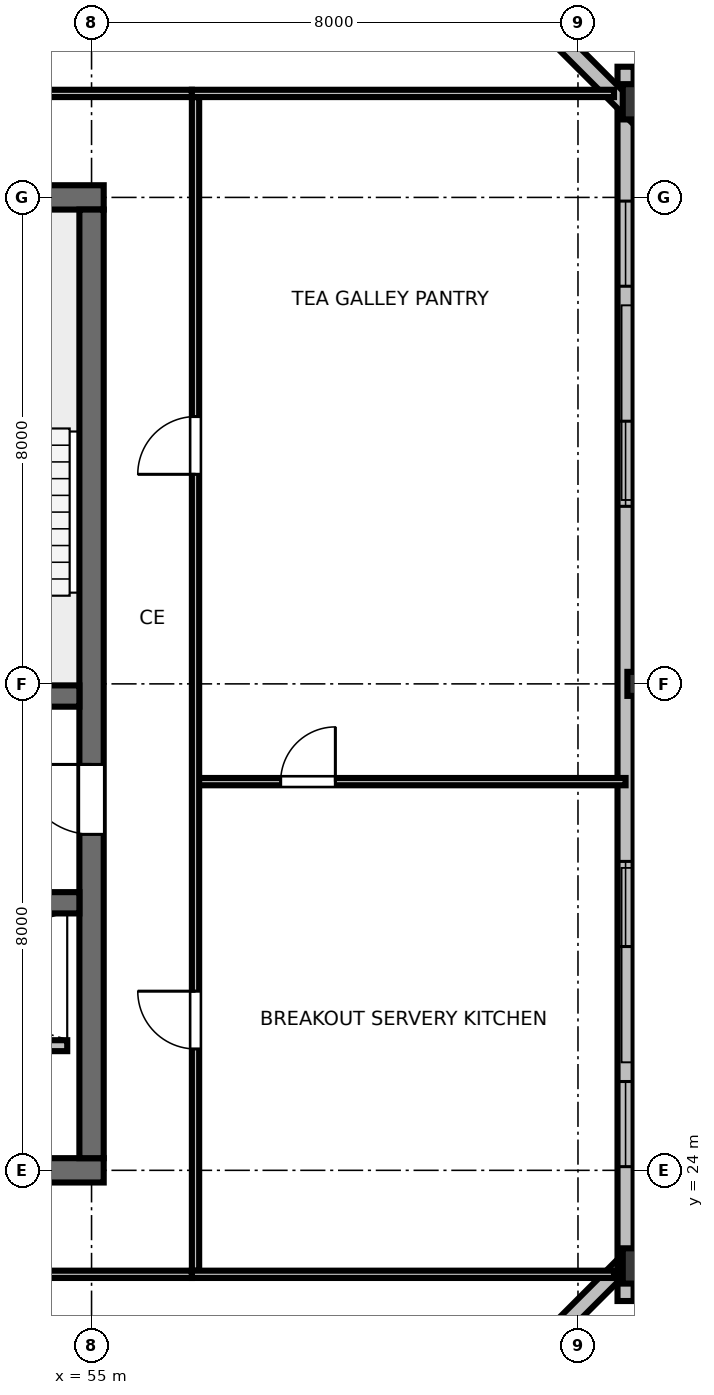
"""IFC4 building model, lengths in metres.
Left out: names, types, materials, properties, quantities, classifications, styles, units other than length and angle.
Written with IfcOpenShell. Run it as: python <this file> out.ifc"""

import sys

from ifc_helpers import new_model, si_unit, direction, frame, frame_2d, origin, origin_2d, place, context, subcontext, project, spatial, rectangle, hollow_rectangle, i_section, extrude, element, fill, save


model = new_model("IFC4")
c1 = context("Model", 3, precision=1e-05, world=origin(), true_north=direction((0.0, 1.0)))
c2 = subcontext(c1, "Body", "Model", "MODEL_VIEW")
j1 = project(units=[si_unit("LENGTHUNIT", "METRE"), si_unit("PLANEANGLEUNIT", "RADIAN")], contexts=[c1])
p1 = place(None, origin())
s1 = spatial("IfcSite", under=j1, at=p1, CompositionType="ELEMENT")
p2 = place(p1, origin())
s2 = spatial("IfcBuilding", under=s1, at=p2, CompositionType="ELEMENT")
p3 = place(p2, frame((0.0, 0.0, 268.2)))
s3 = spatial("IfcBuildingStorey", under=s2, at=p3, CompositionType="ELEMENT", Elevation=268.2)
p4 = place(p3, frame((36.8, 24.0, 0.0), z_axis=(0.0, 0.0, 1.0), x_axis=(1.0, 0.0, 0.0)))
e1 = element("IfcWall", 1, at=p4, inside=s3, PredefinedType="SHEAR", context=c2, shape_type="SweptSolid", body=[
    extrude(rectangle(XDim=18.4, YDim=0.4, at=frame_2d((9.2, 0.0))), origin(), (0.0, 0.0, 1.0), 3.36),
])
p5 = place(p4, frame((13.4, 0.0, 0.0)))
e2 = element("IfcOpeningElement", 2, at=p5, cuts=e1, PredefinedType="OPENING", context=c2, shape_type="SweptSolid", body=[
    extrude(rectangle(XDim=1.6, YDim=2.15, at=frame_2d((0.8, 1.075))), frame((0.0, 0.21, 0.0), z_axis=(0.0, -1.0, 0.0), x_axis=(1.0, 0.0, 0.0)), (0.0, 0.0, 1.0), 0.42),
])
p6 = place(p3, frame((36.8, 40.0, 0.0), z_axis=(0.0, 0.0, 1.0), x_axis=(1.0, 0.0, 0.0)))
e3 = element("IfcWall", 3, at=p6, inside=s3, PredefinedType="SHEAR", context=c2, shape_type="SweptSolid", body=[
    extrude(rectangle(XDim=18.4, YDim=0.4, at=frame_2d((9.2, 0.0))), origin(), (0.0, 0.0, 1.0), 3.36),
])
p7 = place(p6, frame((10.5, 0.0, 0.0)))
e4 = element("IfcOpeningElement", 4, at=p7, cuts=e3, PredefinedType="OPENING", context=c2, shape_type="SweptSolid", body=[
    extrude(rectangle(XDim=1.0, YDim=2.15, at=frame_2d((0.5, 1.075))), frame((0.0, 0.21, 0.0), z_axis=(0.0, -1.0, 0.0), x_axis=(1.0, 0.0, 0.0)), (0.0, 0.0, 1.0), 0.42),
])
p8 = place(p3, frame((55.0, 24.2, 0.0), z_axis=(0.0, 0.0, 1.0), x_axis=(0.0, 1.0, 0.0)))
e5 = element("IfcWall", 5, at=p8, inside=s3, PredefinedType="SHEAR", context=c2, shape_type="SweptSolid", body=[
    extrude(rectangle(XDim=15.6, YDim=0.4, at=frame_2d((7.8, 0.0))), origin(), (0.0, 0.0, 1.0), 3.36),
])
p9 = place(p8, frame((5.325, 0.0, 0.0)))
e6 = element("IfcOpeningElement", 6, at=p9, cuts=e5, PredefinedType="OPENING", context=c2, shape_type="SweptSolid", body=[
    extrude(rectangle(XDim=1.15, YDim=2.15, at=frame_2d((0.575, 1.075))), frame((0.0, 0.21, 0.0), z_axis=(0.0, -1.0, 0.0), x_axis=(1.0, 0.0, 0.0)), (0.0, 0.0, 1.0), 0.42),
])
p10 = place(p3, frame((37.2, 31.8, 0.0), z_axis=(0.0, 0.0, 1.0), x_axis=(1.0, 0.0, 0.0)))
e7 = element("IfcWall", 7, at=p10, inside=s3, PredefinedType="SHEAR", context=c2, shape_type="SweptSolid", body=[
    extrude(rectangle(XDim=17.6, YDim=0.35, at=frame_2d((8.8, 0.0))), origin(), (0.0, 0.0, 1.0), 3.36),
])
p11 = place(p10, frame((0.85, 0.0, 0.0)))
e8 = element("IfcOpeningElement", 8, at=p11, cuts=e7, PredefinedType="OPENING", context=c2, shape_type="SweptSolid", body=[
    extrude(rectangle(XDim=1.1, YDim=2.15, at=frame_2d((0.55, 1.075))), frame((0.0, 0.185, 0.0), z_axis=(0.0, -1.0, 0.0), x_axis=(1.0, 0.0, 0.0)), (0.0, 0.0, 1.0), 0.37),
])
p12 = place(p10, frame((14.75, 0.0, 0.0)))
e9 = element("IfcOpeningElement", 9, at=p12, cuts=e7, PredefinedType="OPENING", context=c2, shape_type="SweptSolid", body=[
    extrude(rectangle(XDim=1.1, YDim=2.15, at=frame_2d((0.55, 1.075))), frame((0.0, 0.185, 0.0), z_axis=(0.0, -1.0, 0.0), x_axis=(1.0, 0.0, 0.0)), (0.0, 0.0, 1.0), 0.37),
])
p13 = place(p3, frame((37.2, 28.4, 0.0), z_axis=(0.0, 0.0, 1.0), x_axis=(1.0, 0.0, 0.0)))
e10 = element("IfcWall", 10, at=p13, inside=s3, PredefinedType="SHEAR", context=c2, shape_type="SweptSolid", body=[
    extrude(rectangle(XDim=17.6, YDim=0.35, at=frame_2d((8.8, 0.0))), origin(), (0.0, 0.0, 1.0), 3.36),
])
p14 = place(p3, frame((64.086, 22.428, 0.0), z_axis=(-0.177666210098, 0.155370015085, 0.971748360535), x_axis=(0.731494530151, -0.639695731236, 0.236019329289)))
e11 = element("IfcColumn", 11, at=p14, inside=s3, PredefinedType="COLUMN", context=c2, shape_type="SweptSolid", body=[
    extrude(hollow_rectangle(XDim=0.58, YDim=0.7, WallThickness=0.032, at=origin_2d()), origin(), (0.0, 0.0, 1.0), 3.471),
])
p15 = place(p3, frame((64.003, 32.0, 0.0), z_axis=(-0.178954370443, 0.0, 0.98385737447), x_axis=(0.98385737447, 0.0, 0.178954370443)))
e12 = element("IfcColumn", 12, at=p15, inside=s3, PredefinedType="COLUMN", context=c2, shape_type="SweptSolid", body=[
    extrude(i_section(OverallWidth=0.395, OverallDepth=0.38, WebThickness=0.019, FlangeThickness=0.03, FilletRadius=0.025, at=origin_2d()), origin(), (0.0, 0.0, 1.0), 3.428),
])
p16 = place(p3, frame((64.086, 41.572, 0.0), z_axis=(-0.177666210098, -0.155370015085, 0.971748360535), x_axis=(0.731494530151, 0.639695731236, 0.236019329289)))
e13 = element("IfcColumn", 13, at=p16, inside=s3, PredefinedType="COLUMN", context=c2, shape_type="SweptSolid", body=[
    extrude(hollow_rectangle(XDim=0.58, YDim=0.7, WallThickness=0.032, at=origin_2d()), origin(), (0.0, 0.0, 1.0), 3.471),
])
p17 = place(p3, frame((56.47, 15.168, 0.0), z_axis=(0.0, 0.0, 1.0), x_axis=(0.707106781187, 0.707106781187, 0.0)))
e14 = element("IfcWall", 14, at=p17, inside=s3, PredefinedType="STANDARD", context=c2, shape_type="SweptSolid", body=[
    extrude(rectangle(XDim=10.971, YDim=0.265, at=frame_2d((5.485, 0.0))), origin(), (0.0, 0.0, 1.0), 3.375),
])
p18 = place(p3, frame((63.783, 21.851, 0.0), z_axis=(0.0, 0.0, 1.0), x_axis=(0.0, 1.0, 0.0)))
e15 = element("IfcWall", 15, at=p18, inside=s3, PredefinedType="STANDARD", context=c2, shape_type="SweptSolid", body=[
    extrude(rectangle(XDim=20.298, YDim=0.265, at=frame_2d((10.149, 0.0))), origin(), (0.0, 0.0, 1.0), 2.832),
])
p19 = place(p18, frame((2.21, 0.0, 0.85)))
e16 = element("IfcOpeningElement", 16, at=p19, cuts=e15, PredefinedType="OPENING", context=c2, shape_type="SweptSolid", body=[
    extrude(rectangle(XDim=1.4, YDim=1.2, at=frame_2d((0.7, 0.6))), frame((0.0, 0.142, 0.0), z_axis=(0.0, -1.0, 0.0), x_axis=(1.0, 0.0, 0.0)), (0.0, 0.0, 1.0), 0.285),
])
p20 = place(p18, frame((5.83, 0.0, 0.85)))
e17 = element("IfcOpeningElement", 17, at=p20, cuts=e15, PredefinedType="OPENING", context=c2, shape_type="SweptSolid", body=[
    extrude(rectangle(XDim=1.4, YDim=1.2, at=frame_2d((0.7, 0.6))), frame((0.0, 0.142, 0.0), z_axis=(0.0, -1.0, 0.0), x_axis=(1.0, 0.0, 0.0)), (0.0, 0.0, 1.0), 0.285),
])
p21 = place(p18, frame((13.069, 0.0, 0.85)))
e18 = element("IfcOpeningElement", 18, at=p21, cuts=e15, PredefinedType="OPENING", context=c2, shape_type="SweptSolid", body=[
    extrude(rectangle(XDim=1.4, YDim=1.2, at=frame_2d((0.7, 0.6))), frame((0.0, 0.142, 0.0), z_axis=(0.0, -1.0, 0.0), x_axis=(1.0, 0.0, 0.0)), (0.0, 0.0, 1.0), 0.285),
])
p22 = place(p18, frame((16.688, 0.0, 0.85)))
e19 = element("IfcOpeningElement", 19, at=p22, cuts=e15, PredefinedType="OPENING", context=c2, shape_type="SweptSolid", body=[
    extrude(rectangle(XDim=1.4, YDim=1.2, at=frame_2d((0.7, 0.6))), frame((0.0, 0.142, 0.0), z_axis=(0.0, -1.0, 0.0), x_axis=(1.0, 0.0, 0.0)), (0.0, 0.0, 1.0), 0.285),
])
p23 = place(p3, frame((64.228, 41.075, 0.0), z_axis=(0.0, 0.0, 1.0), x_axis=(-0.707106781187, 0.707106781187, 0.0)))
e20 = element("IfcWall", 20, at=p23, inside=s3, PredefinedType="STANDARD", context=c2, shape_type="SweptSolid", body=[
    extrude(rectangle(XDim=10.971, YDim=0.265, at=frame_2d((5.485, 0.0))), origin(), (0.0, 0.0, 1.0), 3.375),
])
p24 = place(p3, frame((47.6, 26.05, 0.0), z_axis=(0.0, 0.0, 1.0), x_axis=(1.0, 0.0, 0.0)))
e21 = element("IfcWall", 21, at=p24, inside=s3, PredefinedType="PARTITIONING", context=c2, shape_type="SweptSolid", body=[
    extrude(rectangle(XDim=7.0, YDim=0.18, at=frame_2d((3.5, 0.0))), origin(), (0.0, 0.0, 1.0), 3.375),
])
p25 = place(p24, frame((1.2, 0.0, 0.0)))
e22 = element("IfcOpeningElement", 22, at=p25, cuts=e21, PredefinedType="OPENING", context=c2, shape_type="SweptSolid", body=[
    extrude(rectangle(XDim=1.05, YDim=2.15, at=frame_2d((0.525, 1.075))), frame((0.0, 0.1, 0.0), z_axis=(0.0, -1.0, 0.0), x_axis=(1.0, 0.0, 0.0)), (0.0, 0.0, 1.0), 0.2),
])
p26 = place(p24, frame((3.4, 0.0, 0.0)))
e23 = element("IfcOpeningElement", 23, at=p26, cuts=e21, PredefinedType="OPENING", context=c2, shape_type="SweptSolid", body=[
    extrude(rectangle(XDim=1.05, YDim=2.15, at=frame_2d((0.525, 1.075))), frame((0.0, 0.1, 0.0), z_axis=(0.0, -1.0, 0.0), x_axis=(1.0, 0.0, 0.0)), (0.0, 0.0, 1.0), 0.2),
])
p27 = place(p3, frame((35.35, 22.29, 0.0), z_axis=(0.0, 0.0, 1.0), x_axis=(1.0, 0.0, 0.0)))
e24 = element("IfcWall", 24, at=p27, inside=s3, PredefinedType="PARTITIONING", context=c2, shape_type="SweptSolid", body=[
    extrude(rectangle(XDim=21.3, YDim=0.12, at=frame_2d((10.65, 0.0))), origin(), (0.0, 0.0, 1.0), 2.655),
])
p28 = place(p27, frame((4.425, 0.0, 0.0)))
e25 = element("IfcOpeningElement", 25, at=p28, cuts=e24, PredefinedType="OPENING", context=c2, shape_type="SweptSolid", body=[
    extrude(rectangle(XDim=0.95, YDim=2.15, at=frame_2d((0.475, 1.075))), frame((0.0, 0.07, 0.0), z_axis=(0.0, -1.0, 0.0), x_axis=(1.0, 0.0, 0.0)), (0.0, 0.0, 1.0), 0.14),
])
p29 = place(p27, frame((13.051, 0.0, 0.0)))
e26 = element("IfcOpeningElement", 26, at=p29, cuts=e24, PredefinedType="OPENING", context=c2, shape_type="SweptSolid", body=[
    extrude(rectangle(XDim=0.95, YDim=2.15, at=frame_2d((0.475, 1.075))), frame((0.0, 0.07, 0.0), z_axis=(0.0, -1.0, 0.0), x_axis=(1.0, 0.0, 0.0)), (0.0, 0.0, 1.0), 0.14),
])
p30 = place(p27, frame((17.811, 0.0, 0.0)))
e27 = element("IfcOpeningElement", 27, at=p30, cuts=e24, PredefinedType="OPENING", context=c2, shape_type="SweptSolid", body=[
    extrude(rectangle(XDim=0.95, YDim=2.15, at=frame_2d((0.475, 1.075))), frame((0.0, 0.07, 0.0), z_axis=(0.0, -1.0, 0.0), x_axis=(1.0, 0.0, 0.0)), (0.0, 0.0, 1.0), 0.14),
])
p31 = place(p3, frame((35.35, 41.71, 0.0), z_axis=(0.0, 0.0, 1.0), x_axis=(1.0, 0.0, 0.0)))
e28 = element("IfcWall", 28, at=p31, inside=s3, PredefinedType="PARTITIONING", context=c2, shape_type="SweptSolid", body=[
    extrude(rectangle(XDim=21.3, YDim=0.12, at=frame_2d((10.65, 0.0))), origin(), (0.0, 0.0, 1.0), 2.655),
])
p32 = place(p31, frame((4.361, 0.0, 0.0)))
e29 = element("IfcOpeningElement", 29, at=p32, cuts=e28, PredefinedType="OPENING", context=c2, shape_type="SweptSolid", body=[
    extrude(rectangle(XDim=0.95, YDim=2.15, at=frame_2d((0.475, 1.075))), frame((0.0, 0.07, 0.0), z_axis=(0.0, -1.0, 0.0), x_axis=(1.0, 0.0, 0.0)), (0.0, 0.0, 1.0), 0.14),
])
p33 = place(p31, frame((15.925, 0.0, 0.0)))
e30 = element("IfcOpeningElement", 30, at=p33, cuts=e28, PredefinedType="OPENING", context=c2, shape_type="SweptSolid", body=[
    extrude(rectangle(XDim=0.95, YDim=2.15, at=frame_2d((0.475, 1.075))), frame((0.0, 0.07, 0.0), z_axis=(0.0, -1.0, 0.0), x_axis=(1.0, 0.0, 0.0)), (0.0, 0.0, 1.0), 0.14),
])
p34 = place(p3, frame((56.71, 30.392, 0.0), z_axis=(0.0, 0.0, 1.0), x_axis=(1.0, 0.0, 0.0)))
e31 = element("IfcWall", 31, at=p34, inside=s3, PredefinedType="PARTITIONING", context=c2, shape_type="SweptSolid", body=[
    extrude(rectangle(XDim=7.073, YDim=0.12, at=frame_2d((3.536, 0.0))), origin(), (0.0, 0.0, 1.0), 2.655),
])
p35 = place(p34, frame((1.4, 0.0, 0.0)))
e32 = element("IfcOpeningElement", 32, at=p35, cuts=e31, PredefinedType="OPENING", context=c2, shape_type="SweptSolid", body=[
    extrude(rectangle(XDim=0.9, YDim=2.15, at=frame_2d((0.45, 1.075))), frame((0.0, 0.07, 0.0), z_axis=(0.0, -1.0, 0.0), x_axis=(1.0, 0.0, 0.0)), (0.0, 0.0, 1.0), 0.14),
])
p36 = place(p3, frame((56.71, 22.35, 0.0), z_axis=(0.0, 0.0, 1.0), x_axis=(0.0, 1.0, 0.0)))
e33 = element("IfcWall", 33, at=p36, inside=s3, PredefinedType="PARTITIONING", context=c2, shape_type="SweptSolid", body=[
    extrude(rectangle(XDim=19.3, YDim=0.12, at=frame_2d((9.65, 0.0))), origin(), (0.0, 0.0, 1.0), 2.655),
])
p37 = place(p36, frame((3.646, 0.0, 0.0)))
e34 = element("IfcOpeningElement", 34, at=p37, cuts=e33, PredefinedType="OPENING", context=c2, shape_type="SweptSolid", body=[
    extrude(rectangle(XDim=0.95, YDim=2.15, at=frame_2d((0.475, 1.075))), frame((0.0, 0.07, 0.0), z_axis=(0.0, -1.0, 0.0), x_axis=(1.0, 0.0, 0.0)), (0.0, 0.0, 1.0), 0.14),
])
p38 = place(p36, frame((13.096, 0.0, 0.0)))
e35 = element("IfcOpeningElement", 35, at=p38, cuts=e33, PredefinedType="OPENING", context=c2, shape_type="SweptSolid", body=[
    extrude(rectangle(XDim=0.95, YDim=2.15, at=frame_2d((0.475, 1.075))), frame((0.0, 0.07, 0.0), z_axis=(0.0, -1.0, 0.0), x_axis=(1.0, 0.0, 0.0)), (0.0, 0.0, 1.0), 0.14),
])
for number, where, z_axis, x_axis in (
    (36, (56.65, 22.29, 0.0), (0.0, 0.0, 1.0), (1.0, 0.0, 0.0)),
    (37, (56.65, 41.71, 0.0), (0.0, 0.0, 1.0), (1.0, 0.0, 0.0)),
):
    element("IfcWall", number, at=place(p3, frame(where, z_axis=z_axis, x_axis=x_axis)), inside=s3, PredefinedType="PARTITIONING", context=c2, shape_type="SweptSolid", body=[
        extrude(rectangle(XDim=6.942, YDim=0.12, at=frame_2d((3.471, 0.0))), origin(), (0.0, 0.0, 1.0), 2.655),
    ])
p39 = place(p19, origin())
e38 = element("IfcWindow", 38, at=p39, inside=s3, PartitioningType="SINGLE_PANEL", PredefinedType="WINDOW", context=c2, shape_type="SweptSolid", body=[
    extrude(rectangle(XDim=1.4, YDim=1.2, at=frame_2d((0.7, 0.6))), frame((0.0, 0.03, 0.0), z_axis=(0.0, -1.0, 0.0), x_axis=(1.0, 0.0, 0.0)), (0.0, 0.0, 1.0), 0.06),
])
fill(e16, e38)
p40 = place(p20, origin())
e39 = element("IfcWindow", 39, at=p40, inside=s3, PartitioningType="SINGLE_PANEL", PredefinedType="WINDOW", context=c2, shape_type="SweptSolid", body=[
    extrude(rectangle(XDim=1.4, YDim=1.2, at=frame_2d((0.7, 0.6))), frame((0.0, 0.03, 0.0), z_axis=(0.0, -1.0, 0.0), x_axis=(1.0, 0.0, 0.0)), (0.0, 0.0, 1.0), 0.06),
])
fill(e17, e39)
p41 = place(p21, origin())
e40 = element("IfcWindow", 40, at=p41, inside=s3, PartitioningType="SINGLE_PANEL", PredefinedType="WINDOW", context=c2, shape_type="SweptSolid", body=[
    extrude(rectangle(XDim=1.4, YDim=1.2, at=frame_2d((0.7, 0.6))), frame((0.0, 0.03, 0.0), z_axis=(0.0, -1.0, 0.0), x_axis=(1.0, 0.0, 0.0)), (0.0, 0.0, 1.0), 0.06),
])
fill(e18, e40)
p42 = place(p22, origin())
e41 = element("IfcWindow", 41, at=p42, inside=s3, PartitioningType="SINGLE_PANEL", PredefinedType="WINDOW", context=c2, shape_type="SweptSolid", body=[
    extrude(rectangle(XDim=1.4, YDim=1.2, at=frame_2d((0.7, 0.6))), frame((0.0, 0.03, 0.0), z_axis=(0.0, -1.0, 0.0), x_axis=(1.0, 0.0, 0.0)), (0.0, 0.0, 1.0), 0.06),
])
fill(e19, e41)
p43 = place(p9, origin())
e42 = element("IfcDoor", 42, at=p43, inside=s3, OperationType="SINGLE_SWING_RIGHT", PredefinedType="DOOR", context=c2, shape_type="SweptSolid", body=[
    extrude(rectangle(XDim=1.15, YDim=2.15, at=frame_2d((0.575, 1.075))), frame((0.0, 0.025, 0.0), z_axis=(0.0, -1.0, 0.0), x_axis=(1.0, 0.0, 0.0)), (0.0, 0.0, 1.0), 0.05),
])
fill(e6, e42)
p44 = place(p35, origin())
e43 = element("IfcDoor", 43, at=p44, inside=s3, OperationType="SINGLE_SWING_RIGHT", PredefinedType="DOOR", context=c2, shape_type="SweptSolid", body=[
    extrude(rectangle(XDim=0.9, YDim=2.15, at=frame_2d((0.45, 1.075))), frame((0.0, 0.025, 0.0), z_axis=(0.0, -1.0, 0.0), x_axis=(1.0, 0.0, 0.0)), (0.0, 0.0, 1.0), 0.05),
])
fill(e32, e43)
p45 = place(p37, origin())
e44 = element("IfcDoor", 44, at=p45, inside=s3, OperationType="SINGLE_SWING_RIGHT", PredefinedType="DOOR", context=c2, shape_type="SweptSolid", body=[
    extrude(rectangle(XDim=0.95, YDim=2.15, at=frame_2d((0.475, 1.075))), frame((0.0, 0.025, 0.0), z_axis=(0.0, -1.0, 0.0), x_axis=(1.0, 0.0, 0.0)), (0.0, 0.0, 1.0), 0.05),
])
fill(e34, e44)
p46 = place(p38, origin())
e45 = element("IfcDoor", 45, at=p46, inside=s3, OperationType="SINGLE_SWING_LEFT", PredefinedType="DOOR", context=c2, shape_type="SweptSolid", body=[
    extrude(rectangle(XDim=0.95, YDim=2.15, at=frame_2d((0.475, 1.075))), frame((0.0, 0.025, 0.0), z_axis=(0.0, -1.0, 0.0), x_axis=(1.0, 0.0, 0.0)), (0.0, 0.0, 1.0), 0.05),
])
fill(e35, e45)
save(model, sys.argv[1])
